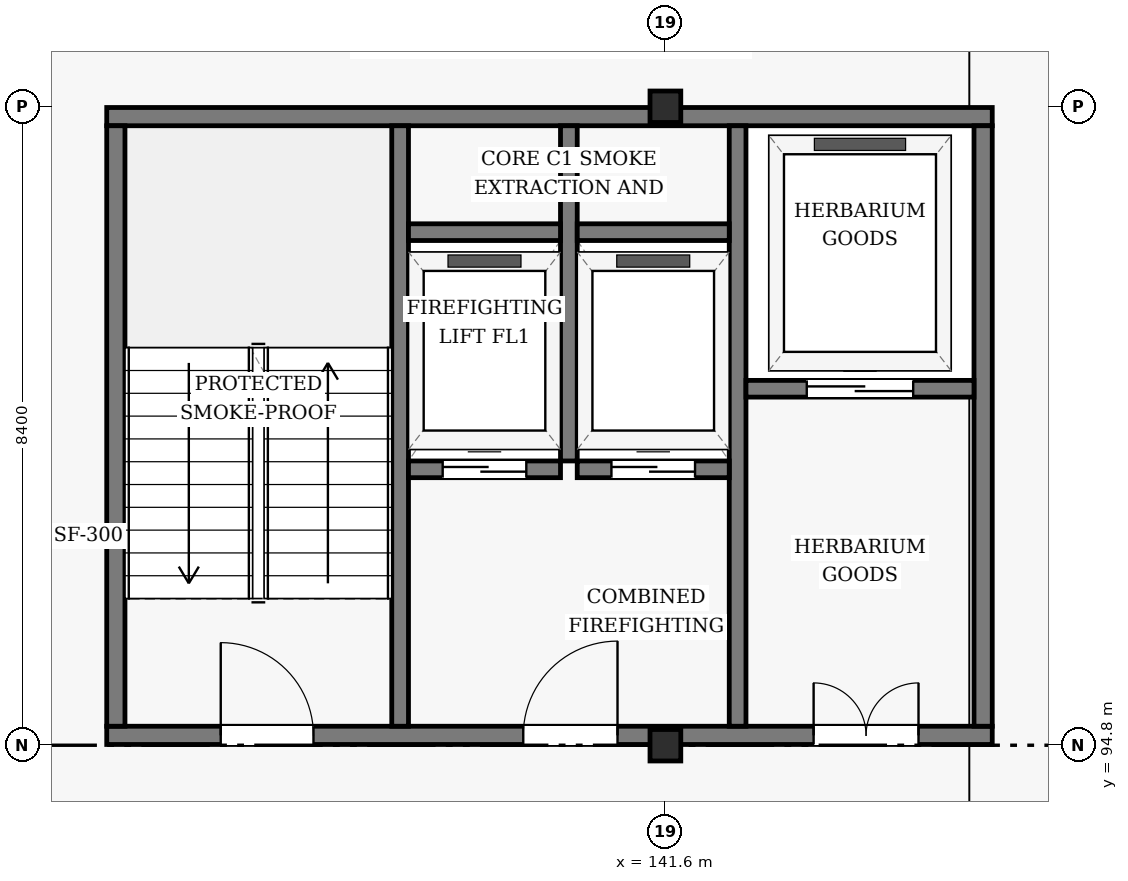
"""IFC4 building model, lengths in metres.
Left out: names, types, materials, properties, quantities, classifications, styles, units other than length and angle.
Written with IfcOpenShell. Run it as: python <this file> out.ifc"""

import sys

from ifc_helpers import new_model, si_unit, direction, frame, frame_2d, origin, origin_2d, place, context, subcontext, project, spatial, rectangle, i_section, extrude, element, fill, save


model = new_model("IFC4")
c1 = context("Model", 3, precision=1e-05, world=origin(), true_north=direction((0.0, 1.0)))
c2 = subcontext(c1, "Body", "Model", "MODEL_VIEW")
j1 = project(units=[si_unit("LENGTHUNIT", "METRE"), si_unit("PLANEANGLEUNIT", "RADIAN")], contexts=[c1])
p1 = place(None, origin())
s1 = spatial("IfcSite", under=j1, at=p1, CompositionType="ELEMENT")
p2 = place(p1, origin())
s2 = spatial("IfcBuilding", under=s1, at=p2, CompositionType="ELEMENT")
p3 = place(p2, frame((0.0, 0.0, 21.0)))
s3 = spatial("IfcBuildingStorey", under=s2, at=p3, CompositionType="ELEMENT", Elevation=21.0)
for number, where, z_axis, x_axis in (
    (1, (141.6, 94.8, 0.0), (0.0, 0.0, 1.0), (1.0, 0.0, 0.0)),
    (2, (141.6, 103.2, 0.0), (0.0, 0.0, 1.0), (1.0, 0.0, 0.0)),
):
    element("IfcColumn", number, at=place(p3, frame(where, z_axis=z_axis, x_axis=x_axis)), inside=s3, PredefinedType="COLUMN", context=c2, shape_type="SweptSolid", body=[
        extrude(i_section(OverallWidth=0.405, OverallDepth=0.414, WebThickness=0.018, FlangeThickness=0.028, FilletRadius=0.022, at=origin_2d()), origin(), (0.0, 0.0, 1.0), 3.6),
    ])
p4 = place(p3, frame((134.25, 94.93, 0.0), z_axis=(0.0, 0.0, 1.0), x_axis=(1.0, 0.0, 0.0)))
e3 = element("IfcWall", 3, at=p4, inside=s3, PredefinedType="SHEAR", context=c2, shape_type="SweptSolid", body=[
    extrude(rectangle(XDim=11.65, YDim=0.24, at=frame_2d((5.825, 0.0))), origin(), (0.0, 0.0, 1.0), 3.35),
])
p5 = place(p4, frame((1.5, 0.0, 0.0)))
e4 = element("IfcOpeningElement", 4, at=p5, cuts=e3, PredefinedType="OPENING", context=c2, shape_type="SweptSolid", body=[
    extrude(rectangle(XDim=1.22, YDim=2.18, at=frame_2d((0.61, 1.09))), frame((0.0, 0.13, 0.0), z_axis=(0.0, -1.0, 0.0), x_axis=(1.0, 0.0, 0.0)), (0.0, 0.0, 1.0), 0.26),
])
p6 = place(p4, frame((5.48, 0.0, 0.0)))
e5 = element("IfcOpeningElement", 5, at=p6, cuts=e3, PredefinedType="OPENING", context=c2, shape_type="SweptSolid", body=[
    extrude(rectangle(XDim=1.24, YDim=2.15, at=frame_2d((0.62, 1.075))), frame((0.0, 0.13, 0.0), z_axis=(0.0, -1.0, 0.0), x_axis=(1.0, 0.0, 0.0)), (0.0, 0.0, 1.0), 0.26),
])
p7 = place(p4, frame((9.3, 0.0, 0.0)))
e6 = element("IfcOpeningElement", 6, at=p7, cuts=e3, PredefinedType="OPENING", context=c2, shape_type="SweptSolid", body=[
    extrude(rectangle(XDim=1.38, YDim=2.15, at=frame_2d((0.69, 1.075))), frame((0.0, 0.13, 0.0), z_axis=(0.0, -1.0, 0.0), x_axis=(1.0, 0.0, 0.0)), (0.0, 0.0, 1.0), 0.26),
])
p8 = place(p3, frame((134.25, 103.07, 0.0), z_axis=(0.0, 0.0, 1.0), x_axis=(1.0, 0.0, 0.0)))
e7 = element("IfcWall", 7, at=p8, inside=s3, PredefinedType="SHEAR", context=c2, shape_type="SweptSolid", body=[
    extrude(rectangle(XDim=11.65, YDim=0.24, at=frame_2d((5.825, 0.0))), origin(), (0.0, 0.0, 1.0), 3.35),
])
p9 = place(p3, frame((134.37, 95.05, 0.0), z_axis=(0.0, 0.0, 1.0), x_axis=(0.0, 1.0, 0.0)))
e8 = element("IfcWall", 8, at=p9, inside=s3, PredefinedType="SHEAR", context=c2, shape_type="SweptSolid", body=[
    extrude(rectangle(XDim=7.9, YDim=0.24, at=frame_2d((3.95, 0.0))), origin(), (0.0, 0.0, 1.0), 3.35),
])
p10 = place(p3, frame((138.11, 95.05, 0.0), z_axis=(0.0, 0.0, 1.0), x_axis=(0.0, 1.0, 0.0)))
e9 = element("IfcWall", 9, at=p10, inside=s3, PredefinedType="SHEAR", context=c2, shape_type="SweptSolid", body=[
    extrude(rectangle(XDim=7.9, YDim=0.22, at=frame_2d((3.95, 0.0))), origin(), (0.0, 0.0, 1.0), 3.35),
])
p11 = place(p3, frame((140.33, 98.54, 0.0), z_axis=(0.0, 0.0, 1.0), x_axis=(0.0, 1.0, 0.0)))
e10 = element("IfcWall", 10, at=p11, inside=s3, PredefinedType="SHEAR", context=c2, shape_type="SweptSolid", body=[
    extrude(rectangle(XDim=4.41, YDim=0.22, at=frame_2d((2.205, 0.0))), origin(), (0.0, 0.0, 1.0), 3.35),
])
p12 = place(p3, frame((142.55, 95.05, 0.0), z_axis=(0.0, 0.0, 1.0), x_axis=(0.0, 1.0, 0.0)))
e11 = element("IfcWall", 11, at=p12, inside=s3, PredefinedType="SHEAR", context=c2, shape_type="SweptSolid", body=[
    extrude(rectangle(XDim=7.9, YDim=0.22, at=frame_2d((3.95, 0.0))), origin(), (0.0, 0.0, 1.0), 3.35),
])
p13 = place(p3, frame((145.78, 95.05, 0.0), z_axis=(0.0, 0.0, 1.0), x_axis=(0.0, 1.0, 0.0)))
e12 = element("IfcWall", 12, at=p13, inside=s3, PredefinedType="SHEAR", context=c2, shape_type="SweptSolid", body=[
    extrude(rectangle(XDim=7.9, YDim=0.24, at=frame_2d((3.95, 0.0))), origin(), (0.0, 0.0, 1.0), 3.35),
])
p14 = place(p3, frame((138.22, 98.43, 0.0), z_axis=(0.0, 0.0, 1.0), x_axis=(1.0, 0.0, 0.0)))
e13 = element("IfcWall", 13, at=p14, inside=s3, PredefinedType="SHEAR", context=c2, shape_type="SweptSolid", body=[
    extrude(rectangle(XDim=2.0, YDim=0.22, at=frame_2d((1.0, 0.0))), origin(), (0.0, 0.0, 1.0), 3.35),
])
p15 = place(p14, frame((0.45, 0.0, 0.0)))
e14 = element("IfcOpeningElement", 14, at=p15, cuts=e13, PredefinedType="OPENING", context=c2, shape_type="SweptSolid", body=[
    extrude(rectangle(XDim=1.1, YDim=2.15, at=frame_2d((0.55, 1.075))), frame((0.0, 0.12, 0.0), z_axis=(0.0, -1.0, 0.0), x_axis=(1.0, 0.0, 0.0)), (0.0, 0.0, 1.0), 0.24),
])
p16 = place(p3, frame((140.44, 98.43, 0.0), z_axis=(0.0, 0.0, 1.0), x_axis=(1.0, 0.0, 0.0)))
e15 = element("IfcWall", 15, at=p16, inside=s3, PredefinedType="SHEAR", context=c2, shape_type="SweptSolid", body=[
    extrude(rectangle(XDim=2.0, YDim=0.22, at=frame_2d((1.0, 0.0))), origin(), (0.0, 0.0, 1.0), 3.35),
])
p17 = place(p16, frame((0.45, 0.0, 0.0)))
e16 = element("IfcOpeningElement", 16, at=p17, cuts=e15, PredefinedType="OPENING", context=c2, shape_type="SweptSolid", body=[
    extrude(rectangle(XDim=1.1, YDim=2.15, at=frame_2d((0.55, 1.075))), frame((0.0, 0.12, 0.0), z_axis=(0.0, -1.0, 0.0), x_axis=(1.0, 0.0, 0.0)), (0.0, 0.0, 1.0), 0.24),
])
for number, where, z_axis, x_axis in (
    (17, (138.22, 101.55, 0.0), (0.0, 0.0, 1.0), (1.0, 0.0, 0.0)),
    (18, (140.44, 101.55, 0.0), (0.0, 0.0, 1.0), (1.0, 0.0, 0.0)),
):
    element("IfcWall", number, at=place(p3, frame(where, z_axis=z_axis, x_axis=x_axis)), inside=s3, PredefinedType="SHEAR", context=c2, shape_type="SweptSolid", body=[
        extrude(rectangle(XDim=2.0, YDim=0.22, at=frame_2d((1.0, 0.0))), origin(), (0.0, 0.0, 1.0), 3.35),
    ])
p18 = place(p3, frame((142.66, 99.49, 0.0), z_axis=(0.0, 0.0, 1.0), x_axis=(1.0, 0.0, 0.0)))
e19 = element("IfcWall", 19, at=p18, inside=s3, PredefinedType="SHEAR", context=c2, shape_type="SweptSolid", body=[
    extrude(rectangle(XDim=3.0, YDim=0.22, at=frame_2d((1.5, 0.0))), origin(), (0.0, 0.0, 1.0), 3.35),
])
p19 = place(p18, frame((0.8, 0.0, 0.0)))
e20 = element("IfcOpeningElement", 20, at=p19, cuts=e19, PredefinedType="OPENING", context=c2, shape_type="SweptSolid", body=[
    extrude(rectangle(XDim=1.4, YDim=2.2, at=frame_2d((0.7, 1.1))), frame((0.0, 0.12, 0.0), z_axis=(0.0, -1.0, 0.0), x_axis=(1.0, 0.0, 0.0)), (0.0, 0.0, 1.0), 0.24),
])
p20 = place(p5, origin())
e21 = element("IfcDoor", 21, at=p20, inside=s3, OperationType="SINGLE_SWING_LEFT", PredefinedType="DOOR", context=c2, shape_type="SweptSolid", body=[
    extrude(rectangle(XDim=1.22, YDim=2.18, at=frame_2d((0.61, 1.09))), frame((0.0, 0.025, 0.0), z_axis=(0.0, -1.0, 0.0), x_axis=(1.0, 0.0, 0.0)), (0.0, 0.0, 1.0), 0.05),
])
fill(e4, e21)
p21 = place(p6, frame((1.24, 0.0, 0.0), z_axis=(0.0, 0.0, 1.0), x_axis=(-1.0, 0.0, 0.0)))
e22 = element("IfcDoor", 22, at=p21, inside=s3, OperationType="SINGLE_SWING_RIGHT", PredefinedType="DOOR", context=c2, shape_type="SweptSolid", body=[
    extrude(rectangle(XDim=1.24, YDim=2.15, at=frame_2d((0.62, 1.075))), frame((0.0, 0.025, 0.0), z_axis=(0.0, -1.0, 0.0), x_axis=(1.0, 0.0, 0.0)), (0.0, 0.0, 1.0), 0.05),
])
fill(e5, e22)
p22 = place(p7, frame((1.38, 0.0, 0.0), z_axis=(0.0, 0.0, 1.0), x_axis=(-1.0, 0.0, 0.0)))
e23 = element("IfcDoor", 23, at=p22, inside=s3, OperationType="DOUBLE_DOOR_SINGLE_SWING", PredefinedType="DOOR", context=c2, shape_type="SweptSolid", body=[
    extrude(rectangle(XDim=1.38, YDim=2.15, at=frame_2d((0.69, 1.075))), frame((0.0, 0.025, 0.0), z_axis=(0.0, -1.0, 0.0), x_axis=(1.0, 0.0, 0.0)), (0.0, 0.0, 1.0), 0.05),
])
fill(e6, e23)
p23 = place(p15, origin())
e24 = element("IfcDoor", 24, at=p23, inside=s3, OperationType="SLIDING_TO_LEFT", PredefinedType="DOOR", context=c2, shape_type="SweptSolid", body=[
    extrude(rectangle(XDim=1.1, YDim=2.15, at=frame_2d((0.55, 1.075))), frame((0.0, 0.025, 0.0), z_axis=(0.0, -1.0, 0.0), x_axis=(1.0, 0.0, 0.0)), (0.0, 0.0, 1.0), 0.05),
])
fill(e14, e24)
p24 = place(p17, origin())
e25 = element("IfcDoor", 25, at=p24, inside=s3, OperationType="SLIDING_TO_LEFT", PredefinedType="DOOR", context=c2, shape_type="SweptSolid", body=[
    extrude(rectangle(XDim=1.1, YDim=2.15, at=frame_2d((0.55, 1.075))), frame((0.0, 0.025, 0.0), z_axis=(0.0, -1.0, 0.0), x_axis=(1.0, 0.0, 0.0)), (0.0, 0.0, 1.0), 0.05),
])
fill(e16, e25)
p25 = place(p19, origin())
e26 = element("IfcDoor", 26, at=p25, inside=s3, OperationType="SLIDING_TO_LEFT", PredefinedType="DOOR", context=c2, shape_type="SweptSolid", body=[
    extrude(rectangle(XDim=1.4, YDim=2.2, at=frame_2d((0.7, 1.1))), frame((0.0, 0.025, 0.0), z_axis=(0.0, -1.0, 0.0), x_axis=(1.0, 0.0, 0.0)), (0.0, 0.0, 1.0), 0.05),
])
fill(e20, e26)
save(model, sys.argv[1])
